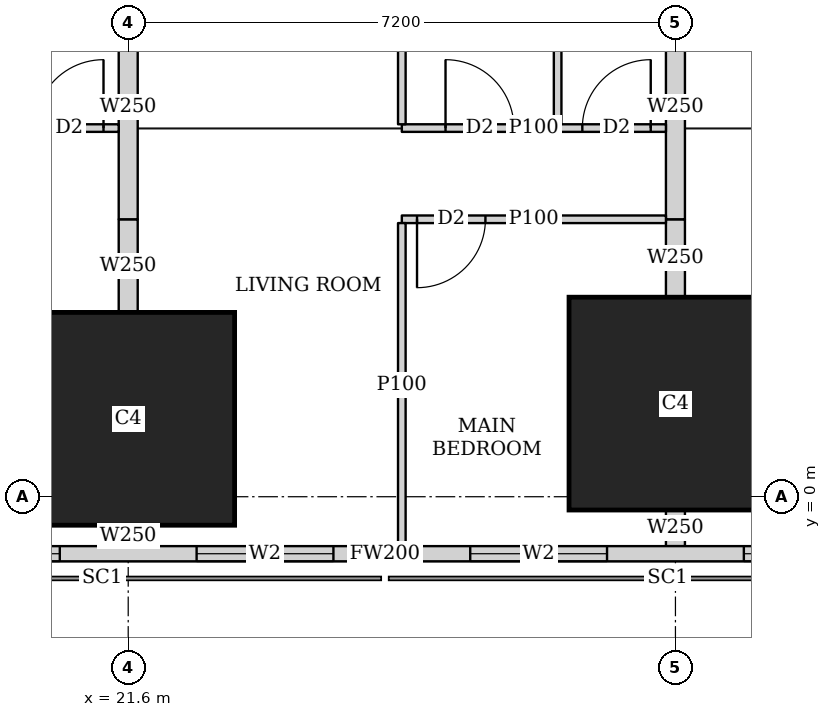
"""IFC4 building model, lengths in metres.
Left out: names, types, materials, properties, quantities, classifications, styles, units other than length and angle.
Written with IfcOpenShell. Run it as: python <this file> out.ifc"""

import sys

from ifc_helpers import new_model, si_unit, direction, frame, frame_2d, origin, origin_2d, place, context, subcontext, project, spatial, rectangle, extrude, element, fill, save


model = new_model("IFC4")
c1 = context("Model", 3, precision=1e-05, world=origin(), true_north=direction((0.0, 1.0)))
c2 = subcontext(c1, "Body", "Model", "MODEL_VIEW")
j1 = project(units=[si_unit("LENGTHUNIT", "METRE"), si_unit("PLANEANGLEUNIT", "RADIAN")], contexts=[c1])
p1 = place(None, origin())
s1 = spatial("IfcSite", under=j1, at=p1, CompositionType="ELEMENT")
p2 = place(p1, origin())
s2 = spatial("IfcBuilding", under=s1, at=p2, CompositionType="ELEMENT")
p3 = place(p2, frame((0.0, 0.0, 42.5)))
s3 = spatial("IfcBuildingStorey", under=s2, at=p3, CompositionType="ELEMENT", Elevation=42.5)
for number, where, z_axis, x_axis in (
    (1, (21.6, 1.025, 0.0), (0.0, 0.0, 1.0), (1.0, 0.0, 0.0)),
    (2, (28.8, 1.225, 0.0), (0.0, 0.0, 1.0), (1.0, 0.0, 0.0)),
):
    element("IfcColumn", number, at=place(p3, frame(where, z_axis=z_axis, x_axis=x_axis)), inside=s3, PredefinedType="COLUMN", context=c2, shape_type="SweptSolid", body=[
        extrude(rectangle(XDim=2.8, YDim=2.8, at=origin_2d()), origin(), (0.0, 0.0, 1.0), 3.75),
    ])
p4 = place(p3, frame((2.163, -0.75, 0.0), z_axis=(0.0, 0.0, 1.0), x_axis=(1.0, 0.0, 0.0)))
e3 = element("IfcWall", 3, at=p4, inside=s3, PredefinedType="SOLIDWALL", context=c2, shape_type="SweptSolid", body=[
    extrude(rectangle(XDim=45.628, YDim=0.2, at=frame_2d((22.814, 0.0))), origin(), (0.0, 0.0, 1.0), 3.5),
])
p5 = place(p4, frame((9.537, 0.0, 0.9)))
e4 = element("IfcOpeningElement", 4, at=p5, cuts=e3, PredefinedType="OPENING", context=c2, shape_type="SweptSolid", body=[
    extrude(rectangle(XDim=1.8, YDim=1.5, at=frame_2d((0.9, 0.75))), frame((0.0, 0.11, 0.0), z_axis=(0.0, -1.0, 0.0), x_axis=(1.0, 0.0, 0.0)), (0.0, 0.0, 1.0), 0.22),
])
p6 = place(p4, frame((13.137, 0.0, 0.9)))
e5 = element("IfcOpeningElement", 5, at=p6, cuts=e3, PredefinedType="OPENING", context=c2, shape_type="SweptSolid", body=[
    extrude(rectangle(XDim=1.8, YDim=1.5, at=frame_2d((0.9, 0.75))), frame((0.0, 0.11, 0.0), z_axis=(0.0, -1.0, 0.0), x_axis=(1.0, 0.0, 0.0)), (0.0, 0.0, 1.0), 0.22),
])
p7 = place(p4, frame((16.737, 0.0, 0.9)))
e6 = element("IfcOpeningElement", 6, at=p7, cuts=e3, PredefinedType="OPENING", context=c2, shape_type="SweptSolid", body=[
    extrude(rectangle(XDim=1.8, YDim=1.5, at=frame_2d((0.9, 0.75))), frame((0.0, 0.11, 0.0), z_axis=(0.0, -1.0, 0.0), x_axis=(1.0, 0.0, 0.0)), (0.0, 0.0, 1.0), 0.22),
])
p8 = place(p4, frame((20.337, 0.0, 0.9)))
e7 = element("IfcOpeningElement", 7, at=p8, cuts=e3, PredefinedType="OPENING", context=c2, shape_type="SweptSolid", body=[
    extrude(rectangle(XDim=1.8, YDim=1.5, at=frame_2d((0.9, 0.75))), frame((0.0, 0.11, 0.0), z_axis=(0.0, -1.0, 0.0), x_axis=(1.0, 0.0, 0.0)), (0.0, 0.0, 1.0), 0.22),
])
p9 = place(p4, frame((23.937, 0.0, 0.9)))
e8 = element("IfcOpeningElement", 8, at=p9, cuts=e3, PredefinedType="OPENING", context=c2, shape_type="SweptSolid", body=[
    extrude(rectangle(XDim=1.8, YDim=1.5, at=frame_2d((0.9, 0.75))), frame((0.0, 0.11, 0.0), z_axis=(0.0, -1.0, 0.0), x_axis=(1.0, 0.0, 0.0)), (0.0, 0.0, 1.0), 0.22),
])
p10 = place(p4, frame((27.537, 0.0, 0.9)))
e9 = element("IfcOpeningElement", 9, at=p10, cuts=e3, PredefinedType="OPENING", context=c2, shape_type="SweptSolid", body=[
    extrude(rectangle(XDim=1.8, YDim=1.5, at=frame_2d((0.9, 0.75))), frame((0.0, 0.11, 0.0), z_axis=(0.0, -1.0, 0.0), x_axis=(1.0, 0.0, 0.0)), (0.0, 0.0, 1.0), 0.22),
])
p11 = place(p4, frame((31.137, 0.0, 0.9)))
e10 = element("IfcOpeningElement", 10, at=p11, cuts=e3, PredefinedType="OPENING", context=c2, shape_type="SweptSolid", body=[
    extrude(rectangle(XDim=1.8, YDim=1.5, at=frame_2d((0.9, 0.75))), frame((0.0, 0.11, 0.0), z_axis=(0.0, -1.0, 0.0), x_axis=(1.0, 0.0, 0.0)), (0.0, 0.0, 1.0), 0.22),
])
p12 = place(p4, frame((34.737, 0.0, 0.9)))
e11 = element("IfcOpeningElement", 11, at=p12, cuts=e3, PredefinedType="OPENING", context=c2, shape_type="SweptSolid", body=[
    extrude(rectangle(XDim=1.8, YDim=1.5, at=frame_2d((0.9, 0.75))), frame((0.0, 0.11, 0.0), z_axis=(0.0, -1.0, 0.0), x_axis=(1.0, 0.0, 0.0)), (0.0, 0.0, 1.0), 0.22),
])
p13 = place(p3, frame((21.475, 4.85, 0.0), z_axis=(0.0, 0.0, 1.0), x_axis=(-1.0, 0.0, 0.0)))
e12 = element("IfcWall", 12, at=p13, inside=s3, PredefinedType="PARTITIONING", context=c2, shape_type="SweptSolid", body=[
    extrude(rectangle(XDim=3.475, YDim=0.1, at=frame_2d((1.738, 0.0))), origin(), (0.0, 0.0, 1.0), 3.5),
])
p14 = place(p13, frame((2.0, 0.0, 0.0)))
e13 = element("IfcOpeningElement", 13, at=p14, cuts=e12, PredefinedType="OPENING", context=c2, shape_type="SweptSolid", body=[
    extrude(rectangle(XDim=0.9, YDim=2.1, at=frame_2d((0.45, 1.05))), frame((0.0, 0.06, 0.0), z_axis=(0.0, -1.0, 0.0), x_axis=(1.0, 0.0, 0.0)), (0.0, 0.0, 1.0), 0.12),
])
p15 = place(p13, frame((0.2, 0.0, 0.0)))
e14 = element("IfcOpeningElement", 14, at=p15, cuts=e12, PredefinedType="OPENING", context=c2, shape_type="SweptSolid", body=[
    extrude(rectangle(XDim=0.9, YDim=2.1, at=frame_2d((0.45, 1.05))), frame((0.0, 0.06, 0.0), z_axis=(0.0, -1.0, 0.0), x_axis=(1.0, 0.0, 0.0)), (0.0, 0.0, 1.0), 0.12),
])
p16 = place(p3, frame((28.675, 3.65, 0.0), z_axis=(0.0, 0.0, 1.0), x_axis=(-1.0, 0.0, 0.0)))
e15 = element("IfcWall", 15, at=p16, inside=s3, PredefinedType="PARTITIONING", context=c2, shape_type="SweptSolid", body=[
    extrude(rectangle(XDim=3.475, YDim=0.1, at=frame_2d((1.738, 0.0))), origin(), (0.0, 0.0, 1.0), 3.5),
])
p17 = place(p16, frame((2.375, 0.0, 0.0)))
e16 = element("IfcOpeningElement", 16, at=p17, cuts=e15, PredefinedType="OPENING", context=c2, shape_type="SweptSolid", body=[
    extrude(rectangle(XDim=0.9, YDim=2.1, at=frame_2d((0.45, 1.05))), frame((0.0, 0.06, 0.0), z_axis=(0.0, -1.0, 0.0), x_axis=(1.0, 0.0, 0.0)), (0.0, 0.0, 1.0), 0.12),
])
p18 = place(p3, frame((28.675, 4.85, 0.0), z_axis=(0.0, 0.0, 1.0), x_axis=(-1.0, 0.0, 0.0)))
e17 = element("IfcWall", 17, at=p18, inside=s3, PredefinedType="PARTITIONING", context=c2, shape_type="SweptSolid", body=[
    extrude(rectangle(XDim=3.475, YDim=0.1, at=frame_2d((1.738, 0.0))), origin(), (0.0, 0.0, 1.0), 3.5),
])
p19 = place(p18, frame((2.0, 0.0, 0.0)))
e18 = element("IfcOpeningElement", 18, at=p19, cuts=e17, PredefinedType="OPENING", context=c2, shape_type="SweptSolid", body=[
    extrude(rectangle(XDim=0.9, YDim=2.1, at=frame_2d((0.45, 1.05))), frame((0.0, 0.06, 0.0), z_axis=(0.0, -1.0, 0.0), x_axis=(1.0, 0.0, 0.0)), (0.0, 0.0, 1.0), 0.12),
])
p20 = place(p18, frame((0.2, 0.0, 0.0)))
e19 = element("IfcOpeningElement", 19, at=p20, cuts=e17, PredefinedType="OPENING", context=c2, shape_type="SweptSolid", body=[
    extrude(rectangle(XDim=0.9, YDim=2.1, at=frame_2d((0.45, 1.05))), frame((0.0, 0.06, 0.0), z_axis=(0.0, -1.0, 0.0), x_axis=(1.0, 0.0, 0.0)), (0.0, 0.0, 1.0), 0.12),
])
p21 = place(p3, frame((25.2, -0.65, 0.0), z_axis=(0.0, 0.0, 1.0), x_axis=(0.0, 1.0, 0.0)))
e20 = element("IfcWall", 20, at=p21, inside=s3, PredefinedType="PARTITIONING", context=c2, shape_type="SweptSolid", body=[
    extrude(rectangle(XDim=4.25, YDim=0.1, at=frame_2d((2.125, 0.0))), origin(), (0.0, 0.0, 1.0), 2.05),
])
for number, where, z_axis, x_axis in (
    (21, (25.2, 4.9, 0.0), (0.0, 0.0, 1.0), (0.0, 1.0, 0.0)),
    (22, (27.25, 4.9, 0.0), (0.0, 0.0, 1.0), (0.0, 1.0, 0.0)),
):
    element("IfcWall", number, at=place(p3, frame(where, z_axis=z_axis, x_axis=x_axis)), inside=s3, PredefinedType="PARTITIONING", context=c2, shape_type="SweptSolid", body=[
        extrude(rectangle(XDim=3.525, YDim=0.1, at=frame_2d((1.763, 0.0))), origin(), (0.0, 0.0, 1.0), 3.5),
    ])
p22 = place(p3, frame((21.6, -0.65, 0.0), z_axis=(0.0, 0.0, 1.0), x_axis=(0.0, 1.0, 0.0)))
e23 = element("IfcWall", 23, at=p22, inside=s3, PredefinedType="SOLIDWALL", context=c2, shape_type="SweptSolid", body=[
    extrude(rectangle(XDim=0.274, YDim=0.25, at=frame_2d((0.137, 0.0))), origin(), (0.0, 0.0, 1.0), 3.5),
])
p23 = place(p3, frame((21.6, 2.426, 0.0), z_axis=(0.0, 0.0, 1.0), x_axis=(0.0, 1.0, 0.0)))
e24 = element("IfcWall", 24, at=p23, inside=s3, PredefinedType="SOLIDWALL", context=c2, shape_type="SweptSolid", body=[
    extrude(rectangle(XDim=1.224, YDim=0.25, at=frame_2d((0.612, 0.0))), origin(), (0.0, 0.0, 1.0), 3.5),
])
p24 = place(p3, frame((21.6, 3.65, 0.0), z_axis=(0.0, 0.0, 1.0), x_axis=(0.0, 1.0, 0.0)))
e25 = element("IfcWall", 25, at=p24, inside=s3, PredefinedType="SOLIDWALL", context=c2, shape_type="SweptSolid", body=[
    extrude(rectangle(XDim=2.949, YDim=0.25, at=frame_2d((1.475, 0.0))), origin(), (0.0, 0.0, 1.0), 3.5),
])
p25 = place(p3, frame((28.8, -0.65, 0.0), z_axis=(0.0, 0.0, 1.0), x_axis=(0.0, 1.0, 0.0)))
e26 = element("IfcWall", 26, at=p25, inside=s3, PredefinedType="SOLIDWALL", context=c2, shape_type="SweptSolid", body=[
    extrude(rectangle(XDim=0.474, YDim=0.25, at=frame_2d((0.237, 0.0))), origin(), (0.0, 0.0, 1.0), 3.5),
])
p26 = place(p3, frame((28.8, 2.626, 0.0), z_axis=(0.0, 0.0, 1.0), x_axis=(0.0, 1.0, 0.0)))
e27 = element("IfcWall", 27, at=p26, inside=s3, PredefinedType="SOLIDWALL", context=c2, shape_type="SweptSolid", body=[
    extrude(rectangle(XDim=1.024, YDim=0.25, at=frame_2d((0.512, 0.0))), origin(), (0.0, 0.0, 1.0), 3.5),
])
p27 = place(p3, frame((28.8, 3.65, 0.0), z_axis=(0.0, 0.0, 1.0), x_axis=(0.0, 1.0, 0.0)))
e28 = element("IfcWall", 28, at=p27, inside=s3, PredefinedType="SOLIDWALL", context=c2, shape_type="SweptSolid", body=[
    extrude(rectangle(XDim=2.949, YDim=0.25, at=frame_2d((1.475, 0.0))), origin(), (0.0, 0.0, 1.0), 3.5),
])
p28 = place(p7, origin())
e29 = element("IfcWindow", 29, at=p28, inside=s3, PartitioningType="SINGLE_PANEL", PredefinedType="WINDOW", context=c2, shape_type="SweptSolid", body=[
    extrude(rectangle(XDim=1.8, YDim=1.5, at=frame_2d((0.9, 0.75))), frame((0.0, 0.03, 0.0), z_axis=(0.0, -1.0, 0.0), x_axis=(1.0, 0.0, 0.0)), (0.0, 0.0, 1.0), 0.06),
])
fill(e6, e29)
p29 = place(p8, origin())
e30 = element("IfcWindow", 30, at=p29, inside=s3, PartitioningType="SINGLE_PANEL", PredefinedType="WINDOW", context=c2, shape_type="SweptSolid", body=[
    extrude(rectangle(XDim=1.8, YDim=1.5, at=frame_2d((0.9, 0.75))), frame((0.0, 0.03, 0.0), z_axis=(0.0, -1.0, 0.0), x_axis=(1.0, 0.0, 0.0)), (0.0, 0.0, 1.0), 0.06),
])
fill(e7, e30)
p30 = place(p9, origin())
e31 = element("IfcWindow", 31, at=p30, inside=s3, PartitioningType="SINGLE_PANEL", PredefinedType="WINDOW", context=c2, shape_type="SweptSolid", body=[
    extrude(rectangle(XDim=1.8, YDim=1.5, at=frame_2d((0.9, 0.75))), frame((0.0, 0.03, 0.0), z_axis=(0.0, -1.0, 0.0), x_axis=(1.0, 0.0, 0.0)), (0.0, 0.0, 1.0), 0.06),
])
fill(e8, e31)
p31 = place(p10, origin())
e32 = element("IfcWindow", 32, at=p31, inside=s3, PartitioningType="SINGLE_PANEL", PredefinedType="WINDOW", context=c2, shape_type="SweptSolid", body=[
    extrude(rectangle(XDim=1.8, YDim=1.5, at=frame_2d((0.9, 0.75))), frame((0.0, 0.03, 0.0), z_axis=(0.0, -1.0, 0.0), x_axis=(1.0, 0.0, 0.0)), (0.0, 0.0, 1.0), 0.06),
])
fill(e9, e32)
p32 = place(p15, origin())
e33 = element("IfcDoor", 33, at=p32, inside=s3, OperationType="SINGLE_SWING_RIGHT", PredefinedType="DOOR", context=c2, shape_type="SweptSolid", body=[
    extrude(rectangle(XDim=0.9, YDim=2.1, at=frame_2d((0.45, 1.05))), frame((0.0, 0.025, 0.0), z_axis=(0.0, -1.0, 0.0), x_axis=(1.0, 0.0, 0.0)), (0.0, 0.0, 1.0), 0.05),
])
fill(e14, e33)
p33 = place(p17, origin())
e34 = element("IfcDoor", 34, at=p33, inside=s3, OperationType="SINGLE_SWING_RIGHT", PredefinedType="DOOR", context=c2, shape_type="SweptSolid", body=[
    extrude(rectangle(XDim=0.9, YDim=2.1, at=frame_2d((0.45, 1.05))), frame((0.0, 0.025, 0.0), z_axis=(0.0, -1.0, 0.0), x_axis=(1.0, 0.0, 0.0)), (0.0, 0.0, 1.0), 0.05),
])
fill(e16, e34)
p34 = place(p19, origin())
e35 = element("IfcDoor", 35, at=p34, inside=s3, OperationType="SINGLE_SWING_LEFT", PredefinedType="DOOR", context=c2, shape_type="SweptSolid", body=[
    extrude(rectangle(XDim=0.9, YDim=2.1, at=frame_2d((0.45, 1.05))), frame((0.0, 0.025, 0.0), z_axis=(0.0, -1.0, 0.0), x_axis=(1.0, 0.0, 0.0)), (0.0, 0.0, 1.0), 0.05),
])
fill(e18, e35)
p35 = place(p20, origin())
e36 = element("IfcDoor", 36, at=p35, inside=s3, OperationType="SINGLE_SWING_RIGHT", PredefinedType="DOOR", context=c2, shape_type="SweptSolid", body=[
    extrude(rectangle(XDim=0.9, YDim=2.1, at=frame_2d((0.45, 1.05))), frame((0.0, 0.025, 0.0), z_axis=(0.0, -1.0, 0.0), x_axis=(1.0, 0.0, 0.0)), (0.0, 0.0, 1.0), 0.05),
])
fill(e19, e36)
save(model, sys.argv[1])
